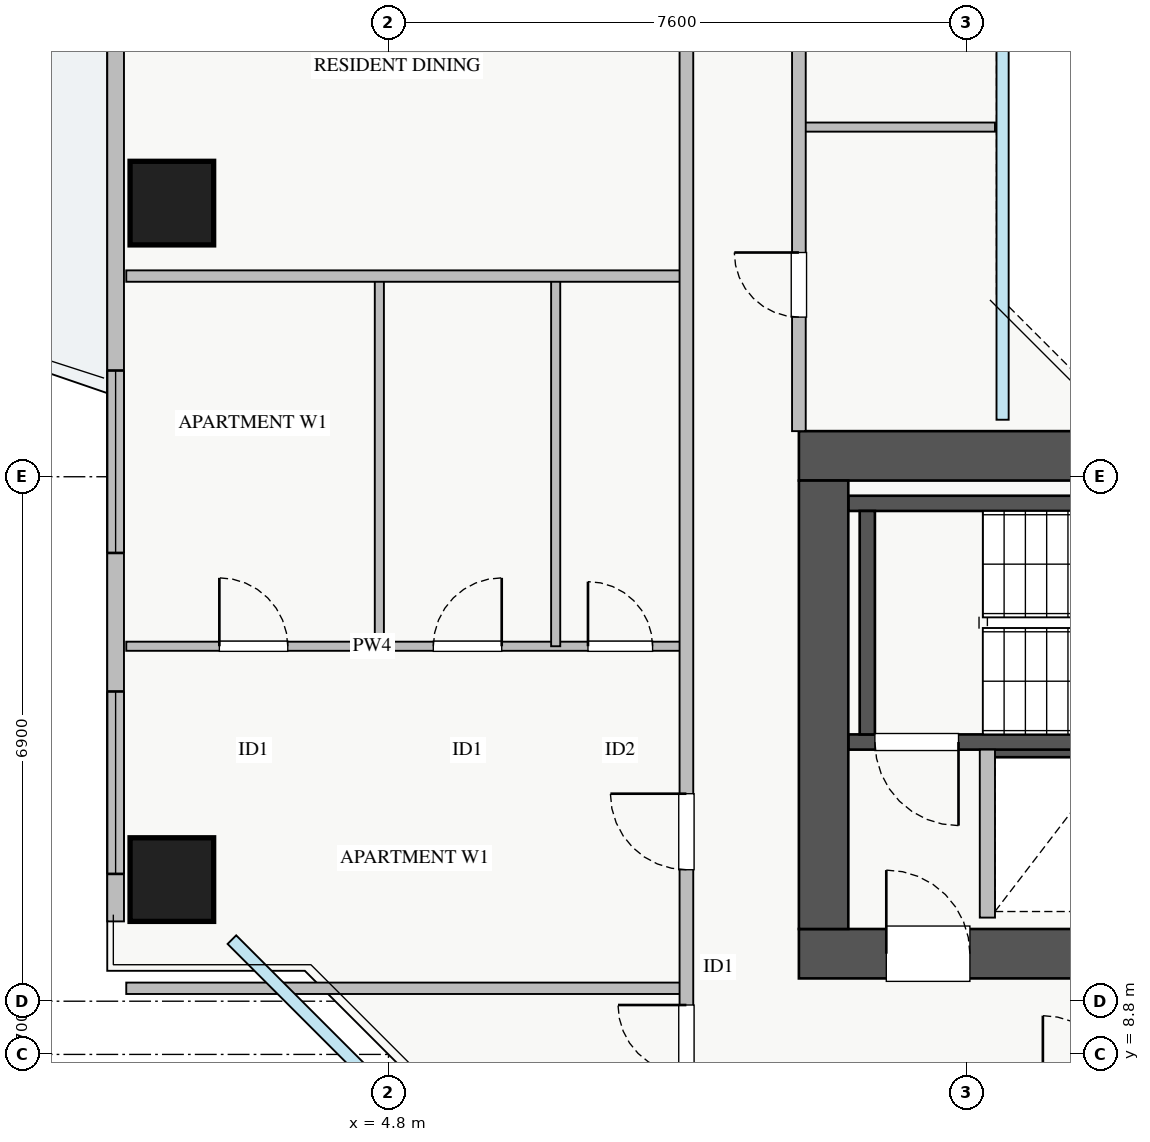
"""IFC4 building model, lengths in metres.
Left out: names, types, materials, properties, quantities, classifications, styles, units other than length and angle.
Written with IfcOpenShell. Run it as: python <this file> out.ifc"""

import sys

from ifc_helpers import new_model, si_unit, direction, frame, frame_2d, origin, origin_2d, place, context, subcontext, project, spatial, rectangle, extrude, source, transform, mapped, element, fill, save


model = new_model("IFC4")
c1 = context("Model", 3, precision=1e-05, world=origin(), true_north=direction((0.0, 1.0)))
c2 = subcontext(c1, "Body", "Model", "MODEL_VIEW")
j1 = project(units=[si_unit("LENGTHUNIT", "METRE"), si_unit("PLANEANGLEUNIT", "RADIAN")], contexts=[c1])
p1 = place(None, origin())
s1 = spatial("IfcSite", under=j1, at=p1, CompositionType="ELEMENT")
p2 = place(p1, origin())
s2 = spatial("IfcBuilding", under=s1, at=p2, CompositionType="ELEMENT")
p3 = place(p2, frame((0.0, 0.0, 129.5)))
s3 = spatial("IfcBuildingStorey", under=s2, at=p3, CompositionType="ELEMENT", Elevation=129.5)
p4 = place(p3, frame((12.68, 12.8, 0.0), z_axis=(0.0, 0.0, 1.0), x_axis=(1.0, 0.0, 0.0)))
e1 = element("IfcWall", 1, at=p4, inside=s3, PredefinedType="SHEAR", context=c2, shape_type="SweptSolid", body=[
    extrude(rectangle(XDim=1.94, YDim=0.18, at=frame_2d((0.97, 0.0))), origin(), (0.0, 0.0, 1.0), 3.07),
])
p5 = place(p3, frame((10.85, 12.91, 0.0), z_axis=(0.0, 0.0, 1.0), x_axis=(1.0, 0.0, 0.0)))
e2 = element("IfcWall", 2, at=p5, inside=s3, PredefinedType="SHEAR", context=c2, shape_type="SweptSolid", body=[
    extrude(rectangle(XDim=7.3, YDim=0.2, at=frame_2d((3.65, 0.0))), origin(), (0.0, 0.0, 1.0), 3.25),
])
p6 = place(p5, frame((0.35, 0.0, 0.0)))
e3 = element("IfcOpeningElement", 3, at=p6, cuts=e2, PredefinedType="OPENING", context=c2, shape_type="SweptSolid", body=[
    extrude(rectangle(XDim=1.1, YDim=2.05, at=frame_2d((0.55, 1.025))), frame((0.0, 0.11, 0.0), z_axis=(0.0, -1.0, 0.0), x_axis=(1.0, 0.0, 0.0)), (0.0, 0.0, 1.0), 0.22),
])
p7 = place(p3, frame((10.85, 16.05, 0.0), z_axis=(0.0, 0.0, 1.0), x_axis=(1.0, 0.0, 0.0)))
e4 = element("IfcWall", 4, at=p7, inside=s3, PredefinedType="SHEAR", context=c2, shape_type="SweptSolid", body=[
    extrude(rectangle(XDim=7.3, YDim=0.2, at=frame_2d((3.65, 0.0))), origin(), (0.0, 0.0, 1.0), 3.25),
])
p8 = place(p3, frame((11.1, 13.01, 0.0), z_axis=(0.0, 0.0, 1.0), x_axis=(0.0, 1.0, 0.0)))
e5 = element("IfcWall", 5, at=p8, inside=s3, PredefinedType="SHEAR", context=c2, shape_type="SweptSolid", body=[
    extrude(rectangle(XDim=2.94, YDim=0.2, at=frame_2d((1.47, 0.0))), origin(), (0.0, 0.0, 1.0), 3.25),
])
p9 = place(p3, frame((10.2, 10.125, 0.0), z_axis=(0.0, 0.0, 1.0), x_axis=(1.0, 0.0, 0.0)))
e6 = element("IfcWall", 6, at=p9, inside=s3, PredefinedType="SHEAR", context=c2, shape_type="SweptSolid", body=[
    extrude(rectangle(XDim=17.6, YDim=0.65, at=frame_2d((8.8, 0.0))), origin(), (0.0, 0.0, 1.0), 3.25),
])
p10 = place(p9, frame((1.15, 0.0, 0.0)))
e7 = element("IfcOpeningElement", 7, at=p10, cuts=e6, PredefinedType="OPENING", context=c2, shape_type="SweptSolid", body=[
    extrude(rectangle(XDim=1.1, YDim=2.05, at=frame_2d((0.55, 1.025))), frame((0.0, 0.335, 0.0), z_axis=(0.0, -1.0, 0.0), x_axis=(1.0, 0.0, 0.0)), (0.0, 0.0, 1.0), 0.67),
])
p11 = place(p9, frame((8.3, 0.0, 0.0)))
e8 = element("IfcOpeningElement", 8, at=p11, cuts=e6, PredefinedType="OPENING", context=c2, shape_type="SweptSolid", body=[
    extrude(rectangle(XDim=1.1, YDim=2.05, at=frame_2d((0.55, 1.025))), frame((0.0, 0.335, 0.0), z_axis=(0.0, -1.0, 0.0), x_axis=(1.0, 0.0, 0.0)), (0.0, 0.0, 1.0), 0.67),
])
p12 = place(p9, frame((4.9, 0.0, 0.0)))
e9 = element("IfcOpeningElement", 9, at=p12, cuts=e6, PredefinedType="OPENING", context=c2, shape_type="SweptSolid", body=[
    extrude(rectangle(XDim=1.1, YDim=2.05, at=frame_2d((0.55, 1.025))), frame((0.0, 0.335, 0.0), z_axis=(0.0, -1.0, 0.0), x_axis=(1.0, 0.0, 0.0)), (0.0, 0.0, 1.0), 0.67),
])
p13 = place(p9, frame((14.74, 0.0, 0.0)))
e10 = element("IfcOpeningElement", 10, at=p13, cuts=e6, PredefinedType="OPENING", context=c2, shape_type="SweptSolid", body=[
    extrude(rectangle(XDim=1.0, YDim=2.05, at=frame_2d((0.5, 1.025))), frame((0.0, 0.335, 0.0), z_axis=(0.0, -1.0, 0.0), x_axis=(1.0, 0.0, 0.0)), (0.0, 0.0, 1.0), 0.67),
])
p14 = place(p9, frame((10.64, 0.0, 0.0)))
e11 = element("IfcOpeningElement", 11, at=p14, cuts=e6, PredefinedType="OPENING", context=c2, shape_type="SweptSolid", body=[
    extrude(rectangle(XDim=1.0, YDim=2.05, at=frame_2d((0.5, 1.025))), frame((0.0, 0.335, 0.0), z_axis=(0.0, -1.0, 0.0), x_axis=(1.0, 0.0, 0.0)), (0.0, 0.0, 1.0), 0.67),
])
p15 = place(p9, frame((13.09, 0.0, 0.0)))
e12 = element("IfcOpeningElement", 12, at=p15, cuts=e6, PredefinedType="OPENING", context=c2, shape_type="SweptSolid", body=[
    extrude(rectangle(XDim=1.0, YDim=2.05, at=frame_2d((0.5, 1.025))), frame((0.0, 0.335, 0.0), z_axis=(0.0, -1.0, 0.0), x_axis=(1.0, 0.0, 0.0)), (0.0, 0.0, 1.0), 0.67),
])
p16 = place(p3, frame((10.2, 16.675, 0.0), z_axis=(0.0, 0.0, 1.0), x_axis=(1.0, 0.0, 0.0)))
e13 = element("IfcWall", 13, at=p16, inside=s3, PredefinedType="SHEAR", context=c2, shape_type="SweptSolid", body=[
    extrude(rectangle(XDim=17.6, YDim=0.65, at=frame_2d((8.8, 0.0))), origin(), (0.0, 0.0, 1.0), 3.25),
])
p17 = place(p3, frame((10.525, 10.45, 0.0), z_axis=(0.0, 0.0, 1.0), x_axis=(0.0, 1.0, 0.0)))
e14 = element("IfcWall", 14, at=p17, inside=s3, PredefinedType="SHEAR", context=c2, shape_type="SweptSolid", body=[
    extrude(rectangle(XDim=5.9, YDim=0.65, at=frame_2d((2.95, 0.0))), origin(), (0.0, 0.0, 1.0), 3.25),
])
m1 = source(origin(), c2, "Body", "SweptSolid", [
    extrude(rectangle(XDim=1.1, YDim=1.1, at=origin_2d()), origin(), (0.0, 0.0, 1.0), 3.25),
])
for number, where, z_axis, x_axis in (
    (15, (1.95, 20.0, 0.0), (0.0, 0.0, 1.0), (1.0, 0.0, 0.0)),
    (16, (1.95, 11.1, 0.0), (0.0, 0.0, 1.0), (1.0, 0.0, 0.0)),
):
    element("IfcColumn", number, at=place(p3, frame(where, z_axis=z_axis, x_axis=x_axis)), inside=s3, PredefinedType="COLUMN", context=c2, shape_type="MappedRepresentation", body=[
        mapped(m1, transform((0.0, 0.0, 0.0), x_axis=(1.0, 0.0, 0.0), y_axis=(0.0, 1.0, 0.0), z_axis=(0.0, 0.0, 1.0), scale=1.0)),
    ])
p18 = place(p3, frame((1.21, 10.55, 0.0), z_axis=(0.0, 0.0, 1.0), x_axis=(0.0, 1.0, 0.0)))
e17 = element("IfcWall", 17, at=p18, inside=s3, PredefinedType="STANDARD", context=c2, shape_type="SweptSolid", body=[
    extrude(rectangle(XDim=24.9, YDim=0.22, at=frame_2d((12.45, 0.0))), origin(), (0.0, 0.0, 1.0), 2.61),
])
p19 = place(p18, frame((13.3, 0.0, 0.0)))
e18 = element("IfcOpeningElement", 18, at=p19, cuts=e17, PredefinedType="OPENING", context=c2, shape_type="SweptSolid", body=[
    extrude(rectangle(XDim=1.2, YDim=2.1, at=frame_2d((0.6, 1.05))), frame((0.0, 0.12, 0.0), z_axis=(0.0, -1.0, 0.0), x_axis=(1.0, 0.0, 0.0)), (0.0, 0.0, 1.0), 0.24),
])
p20 = place(p18, frame((0.625, 0.0, 0.9)))
e19 = element("IfcOpeningElement", 19, at=p20, cuts=e17, PredefinedType="OPENING", context=c2, shape_type="SweptSolid", body=[
    extrude(rectangle(XDim=2.4, YDim=1.5, at=frame_2d((1.2, 0.75))), frame((0.0, 0.12, 0.0), z_axis=(0.0, -1.0, 0.0), x_axis=(1.0, 0.0, 0.0)), (0.0, 0.0, 1.0), 0.24),
])
p21 = place(p18, frame((21.82, 0.0, 0.9)))
e20 = element("IfcOpeningElement", 20, at=p21, cuts=e17, PredefinedType="OPENING", context=c2, shape_type="SweptSolid", body=[
    extrude(rectangle(XDim=2.1, YDim=1.5, at=frame_2d((1.05, 0.75))), frame((0.0, 0.12, 0.0), z_axis=(0.0, -1.0, 0.0), x_axis=(1.0, 0.0, 0.0)), (0.0, 0.0, 1.0), 0.24),
])
p22 = place(p18, frame((4.847, 0.0, 0.9)))
e21 = element("IfcOpeningElement", 21, at=p22, cuts=e17, PredefinedType="OPENING", context=c2, shape_type="SweptSolid", body=[
    extrude(rectangle(XDim=2.4, YDim=1.5, at=frame_2d((1.2, 0.75))), frame((0.0, 0.12, 0.0), z_axis=(0.0, -1.0, 0.0), x_axis=(1.0, 0.0, 0.0)), (0.0, 0.0, 1.0), 0.24),
])
p23 = place(p18, frame((16.895, 0.0, 0.9)))
e22 = element("IfcOpeningElement", 22, at=p23, cuts=e17, PredefinedType="OPENING", context=c2, shape_type="SweptSolid", body=[
    extrude(rectangle(XDim=0.9, YDim=1.2, at=frame_2d((0.45, 0.6))), frame((0.0, 0.12, 0.0), z_axis=(0.0, -1.0, 0.0), x_axis=(1.0, 0.0, 0.0)), (0.0, 0.0, 1.0), 0.24),
])
p24 = place(p3, frame((12.68, 10.6, 0.0), z_axis=(0.0, 0.0, 1.0), x_axis=(0.0, 1.0, 0.0)))
e23 = element("IfcWall", 23, at=p24, inside=s3, PredefinedType="PARTITIONING", context=c2, shape_type="SweptSolid", body=[
    extrude(rectangle(XDim=2.21, YDim=0.2, at=frame_2d((1.105, 0.0))), origin(), (0.0, 0.0, 1.0), 3.07),
])
p25 = place(p3, frame((1.35, 9.67, 0.0), z_axis=(0.0, 0.0, 1.0), x_axis=(1.0, 0.0, 0.0)))
e24 = element("IfcWall", 24, at=p25, inside=s3, PredefinedType="PARTITIONING", context=c2, shape_type="SweptSolid", body=[
    extrude(rectangle(XDim=7.37, YDim=0.15, at=frame_2d((3.685, 0.0))), origin(), (0.0, 0.0, 1.0), 3.07),
])
p26 = place(p3, frame((1.35, 14.17, 0.0), z_axis=(0.0, 0.0, 1.0), x_axis=(1.0, 0.0, 0.0)))
e25 = element("IfcWall", 25, at=p26, inside=s3, PredefinedType="PLUMBINGWALL", context=c2, shape_type="SweptSolid", body=[
    extrude(rectangle(XDim=7.37, YDim=0.12, at=frame_2d((3.685, 0.0))), origin(), (0.0, 0.0, 1.0), 3.07),
])
p27 = place(p26, frame((1.225, 0.0, 0.0)))
e26 = element("IfcOpeningElement", 26, at=p27, cuts=e25, PredefinedType="OPENING", context=c2, shape_type="SweptSolid", body=[
    extrude(rectangle(XDim=0.9, YDim=2.05, at=frame_2d((0.45, 1.025))), frame((0.0, 0.07, 0.0), z_axis=(0.0, -1.0, 0.0), x_axis=(1.0, 0.0, 0.0)), (0.0, 0.0, 1.0), 0.14),
])
p28 = place(p26, frame((4.04, 0.0, 0.0)))
e27 = element("IfcOpeningElement", 27, at=p28, cuts=e25, PredefinedType="OPENING", context=c2, shape_type="SweptSolid", body=[
    extrude(rectangle(XDim=0.9, YDim=2.05, at=frame_2d((0.45, 1.025))), frame((0.0, 0.07, 0.0), z_axis=(0.0, -1.0, 0.0), x_axis=(1.0, 0.0, 0.0)), (0.0, 0.0, 1.0), 0.14),
])
p29 = place(p26, frame((6.075, 0.0, 0.0)))
e28 = element("IfcOpeningElement", 28, at=p29, cuts=e25, PredefinedType="OPENING", context=c2, shape_type="SweptSolid", body=[
    extrude(rectangle(XDim=0.85, YDim=2.05, at=frame_2d((0.425, 1.025))), frame((0.0, 0.07, 0.0), z_axis=(0.0, -1.0, 0.0), x_axis=(1.0, 0.0, 0.0)), (0.0, 0.0, 1.0), 0.14),
])
for number, where, z_axis, x_axis in (
    (29, (4.68, 14.17, 0.0), (0.0, 0.0, 1.0), (0.0, 1.0, 0.0)),
    (30, (7.0, 14.17, 0.0), (0.0, 0.0, 1.0), (0.0, 1.0, 0.0)),
):
    element("IfcWall", number, at=place(p3, frame(where, z_axis=z_axis, x_axis=x_axis)), inside=s3, PredefinedType="PLUMBINGWALL", context=c2, shape_type="SweptSolid", body=[
        extrude(rectangle(XDim=4.87, YDim=0.12, at=frame_2d((2.435, 0.0))), origin(), (0.0, 0.0, 1.0), 3.07),
    ])
p30 = place(p3, frame((1.35, 19.04, 0.0), z_axis=(0.0, 0.0, 1.0), x_axis=(1.0, 0.0, 0.0)))
e31 = element("IfcWall", 31, at=p30, inside=s3, PredefinedType="PARTITIONING", context=c2, shape_type="SweptSolid", body=[
    extrude(rectangle(XDim=7.37, YDim=0.15, at=frame_2d((3.685, 0.0))), origin(), (0.0, 0.0, 1.0), 3.07),
])
p31 = place(p3, frame((8.72, 8.31, 0.0), z_axis=(0.0, 0.0, 1.0), x_axis=(0.0, 1.0, 0.0)))
e32 = element("IfcWall", 32, at=p31, inside=s3, PredefinedType="PARTITIONING", context=c2, shape_type="SweptSolid", body=[
    extrude(rectangle(XDim=29.37, YDim=0.18, at=frame_2d((14.685, 0.0))), origin(), (0.0, 0.0, 1.0), 3.07),
])
p32 = place(p31, frame((28.06, 0.0, 0.0)))
e33 = element("IfcOpeningElement", 33, at=p32, cuts=e32, PredefinedType="OPENING", context=c2, shape_type="SweptSolid", body=[
    extrude(rectangle(XDim=0.9, YDim=2.05, at=frame_2d((0.45, 1.025))), frame((0.0, 0.1, 0.0), z_axis=(0.0, -1.0, 0.0), x_axis=(1.0, 0.0, 0.0)), (0.0, 0.0, 1.0), 0.2),
])
p33 = place(p31, frame((0.24, 0.0, 0.0)))
e34 = element("IfcOpeningElement", 34, at=p33, cuts=e32, PredefinedType="OPENING", context=c2, shape_type="SweptSolid", body=[
    extrude(rectangle(XDim=0.9, YDim=2.05, at=frame_2d((0.45, 1.025))), frame((0.0, 0.1, 0.0), z_axis=(0.0, -1.0, 0.0), x_axis=(1.0, 0.0, 0.0)), (0.0, 0.0, 1.0), 0.2),
])
p34 = place(p31, frame((2.92, 0.0, 0.0)))
e35 = element("IfcOpeningElement", 35, at=p34, cuts=e32, PredefinedType="OPENING", context=c2, shape_type="SweptSolid", body=[
    extrude(rectangle(XDim=1.0, YDim=2.05, at=frame_2d((0.5, 1.025))), frame((0.0, 0.1, 0.0), z_axis=(0.0, -1.0, 0.0), x_axis=(1.0, 0.0, 0.0)), (0.0, 0.0, 1.0), 0.2),
])
p35 = place(p31, frame((14.315, 0.0, 0.0)))
e36 = element("IfcOpeningElement", 36, at=p35, cuts=e32, PredefinedType="OPENING", context=c2, shape_type="SweptSolid", body=[
    extrude(rectangle(XDim=1.0, YDim=2.05, at=frame_2d((0.5, 1.025))), frame((0.0, 0.1, 0.0), z_axis=(0.0, -1.0, 0.0), x_axis=(1.0, 0.0, 0.0)), (0.0, 0.0, 1.0), 0.2),
])
p36 = place(p31, frame((20.315, 0.0, 0.0)))
e37 = element("IfcOpeningElement", 37, at=p36, cuts=e32, PredefinedType="OPENING", context=c2, shape_type="SweptSolid", body=[
    extrude(rectangle(XDim=1.0, YDim=2.05, at=frame_2d((0.5, 1.025))), frame((0.0, 0.1, 0.0), z_axis=(0.0, -1.0, 0.0), x_axis=(1.0, 0.0, 0.0)), (0.0, 0.0, 1.0), 0.2),
])
p37 = place(p3, frame((10.2, 21.0, 0.0), z_axis=(0.0, 0.0, 1.0), x_axis=(1.0, 0.0, 0.0)))
e38 = element("IfcWall", 38, at=p37, inside=s3, PredefinedType="PLUMBINGWALL", context=c2, shape_type="SweptSolid", body=[
    extrude(rectangle(XDim=2.58, YDim=0.12, at=frame_2d((1.29, 0.0))), origin(), (0.0, 0.0, 1.0), 3.07),
])
p38 = place(p3, frame((10.2, 17.0, 0.0), z_axis=(0.0, 0.0, 1.0), x_axis=(0.0, 1.0, 0.0)))
e39 = element("IfcWall", 39, at=p38, inside=s3, PredefinedType="PARTITIONING", context=c2, shape_type="SweptSolid", body=[
    extrude(rectangle(XDim=12.0, YDim=0.18, at=frame_2d((6.0, 0.0))), origin(), (0.0, 0.0, 1.0), 3.07),
])
p39 = place(p38, frame((1.5, 0.0, 0.0)))
e40 = element("IfcOpeningElement", 40, at=p39, cuts=e39, PredefinedType="OPENING", context=c2, shape_type="SweptSolid", body=[
    extrude(rectangle(XDim=0.85, YDim=2.05, at=frame_2d((0.425, 1.025))), frame((0.0, 0.1, 0.0), z_axis=(0.0, -1.0, 0.0), x_axis=(1.0, 0.0, 0.0)), (0.0, 0.0, 1.0), 0.2),
])
p40 = place(p38, frame((6.5, 0.0, 0.0)))
e41 = element("IfcOpeningElement", 41, at=p40, cuts=e39, PredefinedType="OPENING", context=c2, shape_type="SweptSolid", body=[
    extrude(rectangle(XDim=1.0, YDim=2.05, at=frame_2d((0.5, 1.025))), frame((0.0, 0.1, 0.0), z_axis=(0.0, -1.0, 0.0), x_axis=(1.0, 0.0, 0.0)), (0.0, 0.0, 1.0), 0.2),
])
m2 = source(origin(), c2, "Body", "SweptSolid", [
    extrude(rectangle(XDim=2.4, YDim=1.5, at=frame_2d((1.2, 0.75))), frame((0.0, 0.03, 0.0), z_axis=(0.0, -1.0, 0.0), x_axis=(1.0, 0.0, 0.0)), (0.0, 0.0, 1.0), 0.06),
])
p41 = place(p20, origin())
e42 = element("IfcWindow", 42, at=p41, inside=s3, PartitioningType="TRIPLE_PANEL_VERTICAL", PredefinedType="WINDOW", context=c2, shape_type="MappedRepresentation", body=[
    mapped(m2, transform((0.0, 0.0, 0.0), x_axis=(1.0, 0.0, 0.0), y_axis=(0.0, 1.0, 0.0), z_axis=(0.0, 0.0, 1.0), scale=1.0)),
])
fill(e19, e42)
m3 = source(origin(), c2, "Body", "SweptSolid", [
    extrude(rectangle(XDim=1.1, YDim=2.05, at=frame_2d((0.55, 1.025))), frame((0.0, 0.025, 0.0), z_axis=(0.0, -1.0, 0.0), x_axis=(1.0, 0.0, 0.0)), (0.0, 0.0, 1.0), 0.05),
])
p42 = place(p10, origin())
e43 = element("IfcDoor", 43, at=p42, inside=s3, OperationType="SINGLE_SWING_LEFT", PredefinedType="DOOR", context=c2, shape_type="MappedRepresentation", body=[
    mapped(m3, transform((0.0, 0.0, 0.0), x_axis=(1.0, 0.0, 0.0), y_axis=(0.0, 1.0, 0.0), z_axis=(0.0, 0.0, 1.0), scale=1.0)),
])
fill(e7, e43)
p43 = place(p6, frame((1.1, 0.0, 0.0), z_axis=(0.0, 0.0, 1.0), x_axis=(-1.0, 0.0, 0.0)))
e44 = element("IfcDoor", 44, at=p43, inside=s3, OperationType="SINGLE_SWING_RIGHT", PredefinedType="DOOR", context=c2, shape_type="MappedRepresentation", body=[
    mapped(m3, transform((0.0, 0.0, 0.0), x_axis=(1.0, 0.0, 0.0), y_axis=(0.0, 1.0, 0.0), z_axis=(0.0, 0.0, 1.0), scale=1.0)),
])
fill(e3, e44)
m4 = source(origin(), c2, "Body", "SweptSolid", [
    extrude(rectangle(XDim=0.9, YDim=2.05, at=frame_2d((0.45, 1.025))), frame((0.0, 0.025, 0.0), z_axis=(0.0, -1.0, 0.0), x_axis=(1.0, 0.0, 0.0)), (0.0, 0.0, 1.0), 0.05),
])
p44 = place(p27, origin())
e45 = element("IfcDoor", 45, at=p44, inside=s3, OperationType="SINGLE_SWING_LEFT", PredefinedType="DOOR", context=c2, shape_type="MappedRepresentation", body=[
    mapped(m4, transform((0.0, 0.0, 0.0), x_axis=(1.0, 0.0, 0.0), y_axis=(0.0, 1.0, 0.0), z_axis=(0.0, 0.0, 1.0), scale=1.0)),
])
fill(e26, e45)
p45 = place(p28, origin())
e46 = element("IfcDoor", 46, at=p45, inside=s3, OperationType="SINGLE_SWING_RIGHT", PredefinedType="DOOR", context=c2, shape_type="MappedRepresentation", body=[
    mapped(m4, transform((0.0, 0.0, 0.0), x_axis=(1.0, 0.0, 0.0), y_axis=(0.0, 1.0, 0.0), z_axis=(0.0, 0.0, 1.0), scale=1.0)),
])
fill(e27, e46)
m5 = source(origin(), c2, "Body", "SweptSolid", [
    extrude(rectangle(XDim=0.85, YDim=2.05, at=frame_2d((0.425, 1.025))), frame((0.0, 0.025, 0.0), z_axis=(0.0, -1.0, 0.0), x_axis=(1.0, 0.0, 0.0)), (0.0, 0.0, 1.0), 0.05),
])
p46 = place(p29, origin())
e47 = element("IfcDoor", 47, at=p46, inside=s3, OperationType="SINGLE_SWING_LEFT", PredefinedType="DOOR", context=c2, shape_type="MappedRepresentation", body=[
    mapped(m5, transform((0.0, 0.0, 0.0), x_axis=(1.0, 0.0, 0.0), y_axis=(0.0, 1.0, 0.0), z_axis=(0.0, 0.0, 1.0), scale=1.0)),
])
fill(e28, e47)
p47 = place(p33, origin())
e48 = element("IfcDoor", 48, at=p47, inside=s3, OperationType="SINGLE_SWING_RIGHT", PredefinedType="DOOR", context=c2, shape_type="MappedRepresentation", body=[
    mapped(m4, transform((0.0, 0.0, 0.0), x_axis=(1.0, 0.0, 0.0), y_axis=(0.0, 1.0, 0.0), z_axis=(0.0, 0.0, 1.0), scale=1.0)),
])
fill(e34, e48)
m6 = source(origin(), c2, "Body", "SweptSolid", [
    extrude(rectangle(XDim=1.0, YDim=2.05, at=frame_2d((0.5, 1.025))), frame((0.0, 0.025, 0.0), z_axis=(0.0, -1.0, 0.0), x_axis=(1.0, 0.0, 0.0)), (0.0, 0.0, 1.0), 0.05),
])
p48 = place(p34, origin())
e49 = element("IfcDoor", 49, at=p48, inside=s3, OperationType="SINGLE_SWING_RIGHT", PredefinedType="DOOR", context=c2, shape_type="MappedRepresentation", body=[
    mapped(m6, transform((0.0, 0.0, 0.0), x_axis=(1.0, 0.0, 0.0), y_axis=(0.0, 1.0, 0.0), z_axis=(0.0, 0.0, 1.0), scale=1.0)),
])
fill(e35, e49)
p49 = place(p39, origin())
e50 = element("IfcDoor", 50, at=p49, inside=s3, OperationType="SINGLE_SWING_RIGHT", PredefinedType="DOOR", context=c2, shape_type="MappedRepresentation", body=[
    mapped(m5, transform((0.0, 0.0, 0.0), x_axis=(1.0, 0.0, 0.0), y_axis=(0.0, 1.0, 0.0), z_axis=(0.0, 0.0, 1.0), scale=1.0)),
])
fill(e40, e50)
p50 = place(p22, origin())
e51 = element("IfcWindow", 51, at=p50, inside=s3, PartitioningType="TRIPLE_PANEL_VERTICAL", PredefinedType="WINDOW", context=c2, shape_type="MappedRepresentation", body=[
    mapped(m2, transform((0.0, 0.0, 0.0), x_axis=(1.0, 0.0, 0.0), y_axis=(0.0, 1.0, 0.0), z_axis=(0.0, 0.0, 1.0), scale=1.0)),
])
fill(e21, e51)
save(model, sys.argv[1])
